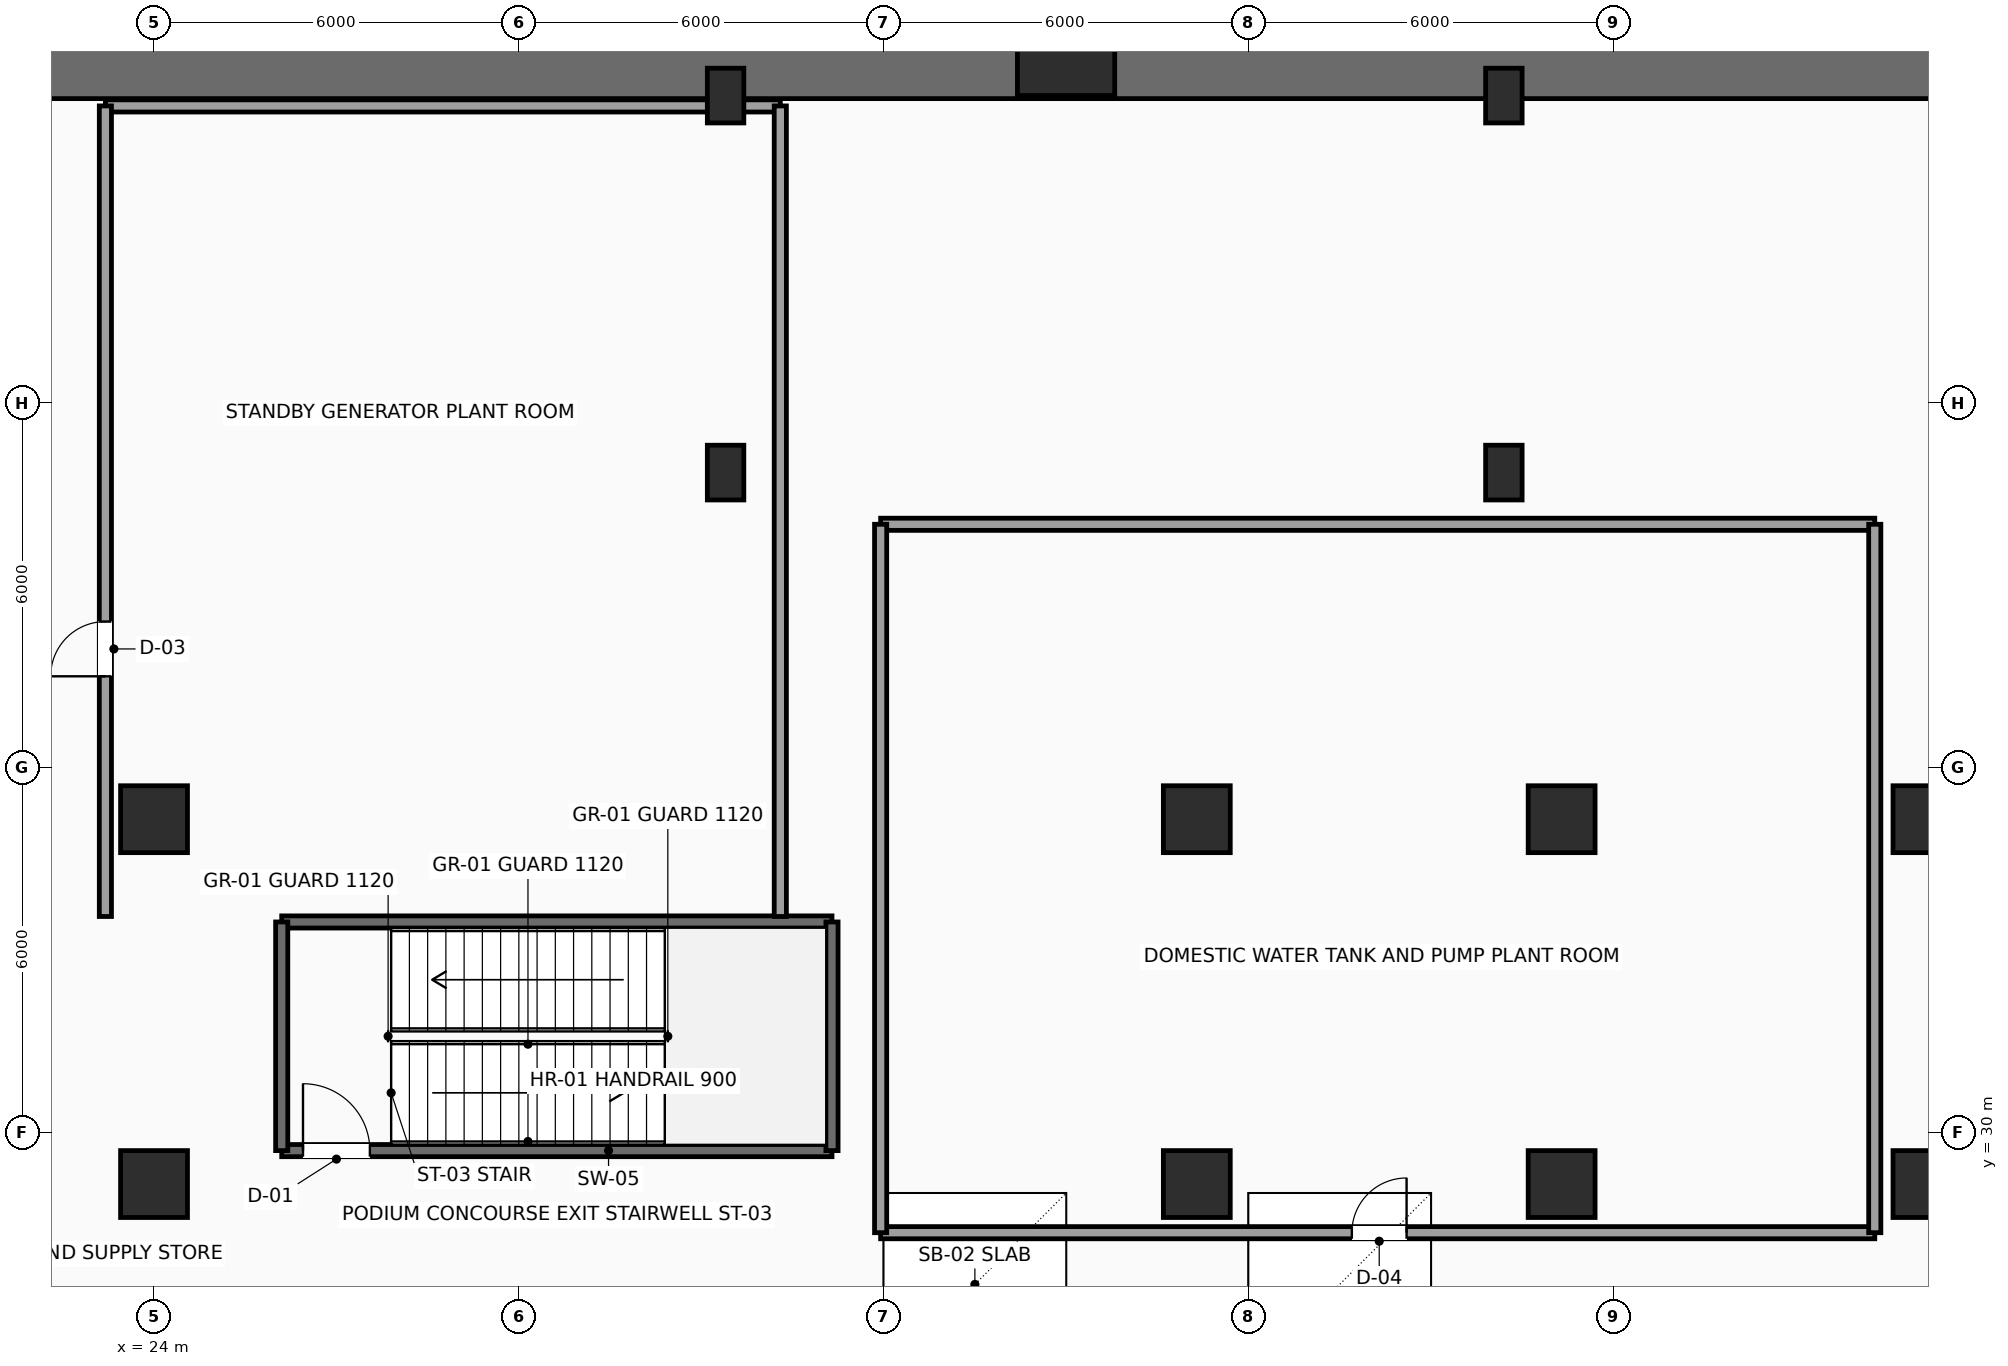
"""IFC4 building model, lengths in metres.
Left out: names, types, materials, properties, quantities, classifications, styles, units other than length and angle.
Written with IfcOpenShell. Run it as: python <this file> out.ifc"""

import sys

from ifc_helpers import new_model, si_unit, direction, frame, frame_2d, origin, origin_2d, place, context, subcontext, project, spatial, rectangle, extrude, element, fill, save


model = new_model("IFC4")
c1 = context("Model", 3, precision=1e-05, world=origin(), true_north=direction((0.0, 1.0)))
c2 = subcontext(c1, "Body", "Model", "MODEL_VIEW")
j1 = project(units=[si_unit("LENGTHUNIT", "METRE"), si_unit("PLANEANGLEUNIT", "RADIAN")], contexts=[c1])
p1 = place(None, origin())
s1 = spatial("IfcSite", under=j1, at=p1, CompositionType="ELEMENT")
p2 = place(p1, origin())
s2 = spatial("IfcBuilding", under=s1, at=p2, CompositionType="ELEMENT")
p3 = place(p2, frame((0.0, 0.0, -9.6)))
s3 = spatial("IfcBuildingStorey", under=s2, at=p3, CompositionType="ELEMENT", Elevation=-9.6)
for number, where, z_axis, x_axis in (
    (1, (24.0, 29.15, 0.0), (0.0, 0.0, 1.0), (1.0, 0.0, 0.0)),
    (2, (24.0, 35.15, 0.0), (0.0, 0.0, 1.0), (1.0, 0.0, 0.0)),
    (3, (41.15, 29.15, 0.0), (0.0, 0.0, 1.0), (1.0, 0.0, 0.0)),
    (4, (41.15, 35.15, 0.0), (0.0, 0.0, 1.0), (1.0, 0.0, 0.0)),
    (5, (47.15, 29.15, 0.0), (0.0, 0.0, 1.0), (1.0, 0.0, 0.0)),
    (6, (47.15, 35.15, 0.0), (0.0, 0.0, 1.0), (1.0, 0.0, 0.0)),
    (7, (53.15, 29.15, 0.0), (0.0, 0.0, 1.0), (1.0, 0.0, 0.0)),
    (8, (53.15, 35.15, 0.0), (0.0, 0.0, 1.0), (1.0, 0.0, 0.0)),
):
    element("IfcColumn", number, at=place(p3, frame(where, z_axis=z_axis, x_axis=x_axis)), inside=s3, PredefinedType="COLUMN", context=c2, shape_type="SweptSolid", body=[
        extrude(rectangle(XDim=1.1, YDim=1.1, at=origin_2d()), origin(), (0.0, 0.0, 1.0), 4.8),
    ])
p4 = place(p3, frame((39.0, 47.45, 0.0), z_axis=(0.0, 0.0, 1.0), x_axis=(0.0, 1.0, 0.0)))
e9 = element("IfcColumn", 9, at=p4, inside=s3, PredefinedType="COLUMN", context=c2, shape_type="SweptSolid", body=[
    extrude(rectangle(XDim=0.8, YDim=1.6, at=origin_2d()), origin(), (0.0, 0.0, 1.0), 4.8),
])
for number, where, z_axis, x_axis in (
    (10, (33.4, 40.85, 0.0), (0.0, 0.0, 1.0), (1.0, 0.0, 0.0)),
    (11, (33.4, 47.05, 0.0), (0.0, 0.0, 1.0), (1.0, 0.0, 0.0)),
    (12, (46.2, 40.85, 0.0), (0.0, 0.0, 1.0), (1.0, 0.0, 0.0)),
    (13, (46.2, 47.05, 0.0), (0.0, 0.0, 1.0), (1.0, 0.0, 0.0)),
):
    element("IfcColumn", number, at=place(p3, frame(where, z_axis=z_axis, x_axis=x_axis)), inside=s3, PredefinedType="COLUMN", context=c2, shape_type="SweptSolid", body=[
        extrude(rectangle(XDim=0.6, YDim=0.9, at=origin_2d()), origin(), (0.0, 0.0, 1.0), 4.8),
    ])
p5 = place(p3, frame((3.0, 47.5, 0.0), z_axis=(0.0, 0.0, 1.0), x_axis=(1.0, 0.0, 0.0)))
e14 = element("IfcWall", 14, at=p5, inside=s3, PredefinedType="USERDEFINED", context=c2, shape_type="SweptSolid", body=[
    extrude(rectangle(XDim=57.0, YDim=1.0, at=frame_2d((28.5, 0.0))), origin(), (0.0, 0.0, 1.0), 4.475),
])
p6 = place(p3, frame((26.1, 29.7, 0.0), z_axis=(0.0, 0.0, 1.0), x_axis=(1.0, 0.0, 0.0)))
e15 = element("IfcWall", 15, at=p6, inside=s3, PredefinedType="SHEAR", context=c2, shape_type="SweptSolid", body=[
    extrude(rectangle(XDim=9.05, YDim=0.2, at=frame_2d((4.525, 0.0))), origin(), (0.0, 0.0, 1.0), 4.475),
])
p7 = place(p6, frame((0.35, 0.0, 0.0)))
e16 = element("IfcOpeningElement", 16, at=p7, cuts=e15, PredefinedType="OPENING", context=c2, shape_type="SweptSolid", body=[
    extrude(rectangle(XDim=1.1, YDim=2.2, at=frame_2d((0.55, 1.1))), frame((0.0, 0.11, 0.0), z_axis=(0.0, -1.0, 0.0), x_axis=(1.0, 0.0, 0.0)), (0.0, 0.0, 1.0), 0.22),
])
p8 = place(p3, frame((26.1, 33.46, 0.0), z_axis=(0.0, 0.0, 1.0), x_axis=(1.0, 0.0, 0.0)))
e17 = element("IfcWall", 17, at=p8, inside=s3, PredefinedType="SHEAR", context=c2, shape_type="SweptSolid", body=[
    extrude(rectangle(XDim=9.05, YDim=0.2, at=frame_2d((4.525, 0.0))), origin(), (0.0, 0.0, 1.0), 4.475),
])
for number, where, z_axis, x_axis in (
    (18, (26.1, 29.7, 0.0), (0.0, 0.0, 1.0), (0.0, 1.0, 0.0)),
    (19, (35.15, 29.7, 0.0), (0.0, 0.0, 1.0), (0.0, 1.0, 0.0)),
):
    element("IfcWall", number, at=place(p3, frame(where, z_axis=z_axis, x_axis=x_axis)), inside=s3, PredefinedType="SHEAR", context=c2, shape_type="SweptSolid", body=[
        extrude(rectangle(XDim=3.76, YDim=0.2, at=frame_2d((1.88, 0.0))), origin(), (0.0, 0.0, 1.0), 4.475),
    ])
p9 = place(p3, frame((35.95, 28.35, 0.0), z_axis=(0.0, 0.0, 1.0), x_axis=(1.0, 0.0, 0.0)))
e20 = element("IfcWall", 20, at=p9, inside=s3, PredefinedType="SOLIDWALL", context=c2, shape_type="SweptSolid", body=[
    extrude(rectangle(XDim=16.35, YDim=0.2, at=frame_2d((8.175, 0.0))), origin(), (0.0, 0.0, 1.0), 4.475),
])
p10 = place(p9, frame((7.75, 0.0, 0.0)))
e21 = element("IfcOpeningElement", 21, at=p10, cuts=e20, PredefinedType="OPENING", context=c2, shape_type="SweptSolid", body=[
    extrude(rectangle(XDim=0.9, YDim=2.15, at=frame_2d((0.45, 1.075))), frame((0.0, 0.11, 0.0), z_axis=(0.0, -1.0, 0.0), x_axis=(1.0, 0.0, 0.0)), (0.0, 0.0, 1.0), 0.22),
])
p11 = place(p3, frame((35.95, 40.0, 0.0), z_axis=(0.0, 0.0, 1.0), x_axis=(1.0, 0.0, 0.0)))
e22 = element("IfcWall", 22, at=p11, inside=s3, PredefinedType="SOLIDWALL", context=c2, shape_type="SweptSolid", body=[
    extrude(rectangle(XDim=16.35, YDim=0.2, at=frame_2d((8.175, 0.0))), origin(), (0.0, 0.0, 1.0), 4.475),
])
for number, where, z_axis, x_axis in (
    (23, (35.95, 28.35, 0.0), (0.0, 0.0, 1.0), (0.0, 1.0, 0.0)),
    (24, (52.3, 28.35, 0.0), (0.0, 0.0, 1.0), (0.0, 1.0, 0.0)),
):
    element("IfcWall", number, at=place(p3, frame(where, z_axis=z_axis, x_axis=x_axis)), inside=s3, PredefinedType="SOLIDWALL", context=c2, shape_type="SweptSolid", body=[
        extrude(rectangle(XDim=11.65, YDim=0.2, at=frame_2d((5.825, 0.0))), origin(), (0.0, 0.0, 1.0), 4.475),
    ])
p12 = place(p3, frame((23.2, 46.88, 0.0), z_axis=(0.0, 0.0, 1.0), x_axis=(1.0, 0.0, 0.0)))
e25 = element("IfcWall", 25, at=p12, inside=s3, PredefinedType="SOLIDWALL", context=c2, shape_type="SweptSolid", body=[
    extrude(rectangle(XDim=11.1, YDim=0.2, at=frame_2d((5.55, 0.0))), origin(), (0.0, 0.0, 1.0), 4.475),
])
p13 = place(p3, frame((23.2, 33.55, 0.0), z_axis=(0.0, 0.0, 1.0), x_axis=(0.0, 1.0, 0.0)))
e26 = element("IfcWall", 26, at=p13, inside=s3, PredefinedType="SOLIDWALL", context=c2, shape_type="SweptSolid", body=[
    extrude(rectangle(XDim=13.33, YDim=0.2, at=frame_2d((6.665, 0.0))), origin(), (0.0, 0.0, 1.0), 4.475),
])
p14 = place(p13, frame((3.95, 0.0, 0.0)))
e27 = element("IfcOpeningElement", 27, at=p14, cuts=e26, PredefinedType="OPENING", context=c2, shape_type="SweptSolid", body=[
    extrude(rectangle(XDim=0.9, YDim=2.15, at=frame_2d((0.45, 1.075))), frame((0.0, 0.11, 0.0), z_axis=(0.0, -1.0, 0.0), x_axis=(1.0, 0.0, 0.0)), (0.0, 0.0, 1.0), 0.22),
])
p15 = place(p3, frame((34.3, 33.55, 0.0), z_axis=(0.0, 0.0, 1.0), x_axis=(0.0, 1.0, 0.0)))
e28 = element("IfcWall", 28, at=p15, inside=s3, PredefinedType="SOLIDWALL", context=c2, shape_type="SweptSolid", body=[
    extrude(rectangle(XDim=13.33, YDim=0.2, at=frame_2d((6.665, 0.0))), origin(), (0.0, 0.0, 1.0), 4.475),
])
p16 = place(p7, origin())
e29 = element("IfcDoor", 29, at=p16, inside=s3, OperationType="SINGLE_SWING_LEFT", PredefinedType="DOOR", context=c2, shape_type="SweptSolid", body=[
    extrude(rectangle(XDim=1.1, YDim=2.2, at=frame_2d((0.55, 1.1))), frame((0.0, 0.025, 0.0), z_axis=(0.0, -1.0, 0.0), x_axis=(1.0, 0.0, 0.0)), (0.0, 0.0, 1.0), 0.05),
])
fill(e16, e29)
p17 = place(p10, origin())
e30 = element("IfcDoor", 30, at=p17, inside=s3, OperationType="SINGLE_SWING_RIGHT", PredefinedType="DOOR", context=c2, shape_type="SweptSolid", body=[
    extrude(rectangle(XDim=0.9, YDim=2.15, at=frame_2d((0.45, 1.075))), frame((0.0, 0.025, 0.0), z_axis=(0.0, -1.0, 0.0), x_axis=(1.0, 0.0, 0.0)), (0.0, 0.0, 1.0), 0.05),
])
fill(e21, e30)
p18 = place(p14, origin())
e31 = element("IfcDoor", 31, at=p18, inside=s3, OperationType="SINGLE_SWING_LEFT", PredefinedType="DOOR", context=c2, shape_type="SweptSolid", body=[
    extrude(rectangle(XDim=0.9, YDim=2.15, at=frame_2d((0.45, 1.075))), frame((0.0, 0.025, 0.0), z_axis=(0.0, -1.0, 0.0), x_axis=(1.0, 0.0, 0.0)), (0.0, 0.0, 1.0), 0.05),
])
fill(e27, e31)
save(model, sys.argv[1])
